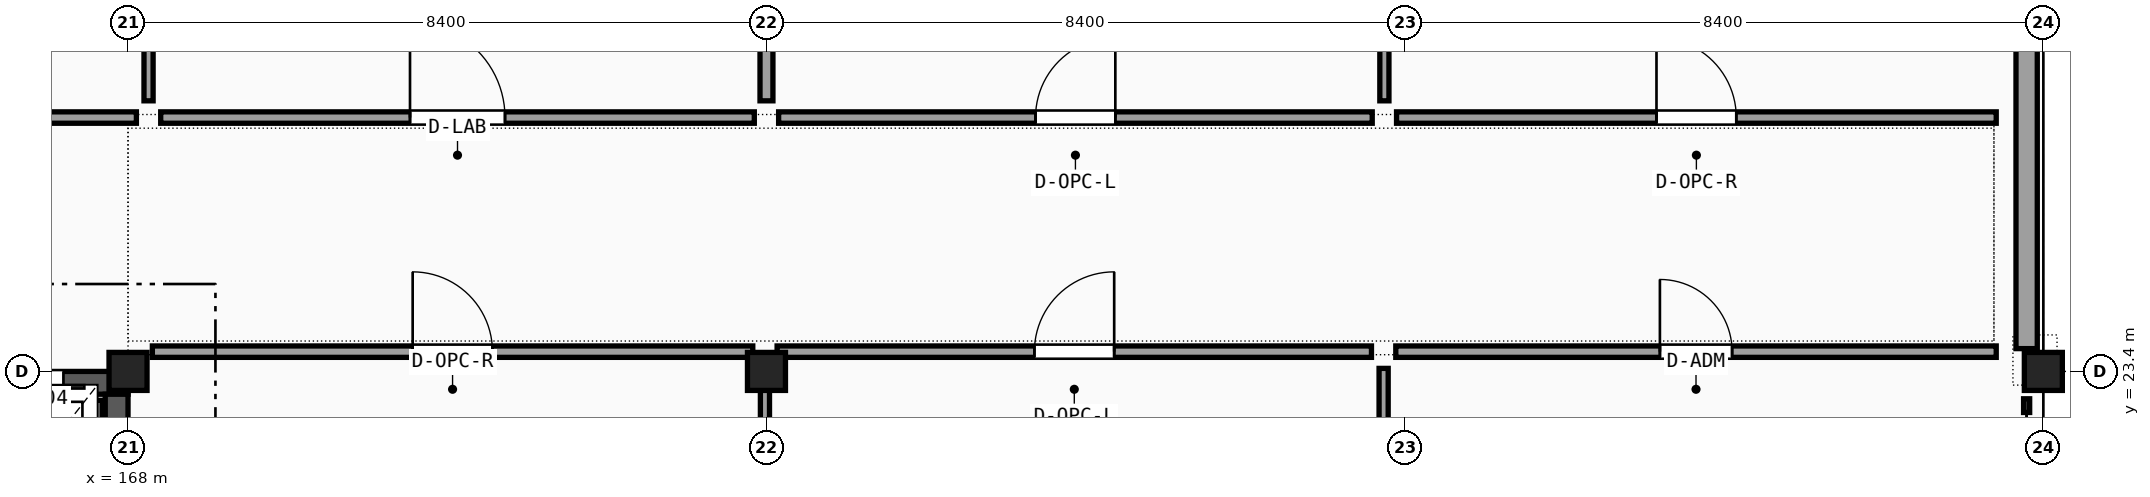
"""IFC4 building model, lengths in metres.
Left out: names, types, materials, properties, quantities, classifications, styles, units other than length and angle.
Written with IfcOpenShell. Run it as: python <this file> out.ifc"""

import sys

from ifc_helpers import new_model, si_unit, direction, frame, frame_2d, origin, origin_2d, place, context, subcontext, project, spatial, rectangle, extrude, element, fill, save


model = new_model("IFC4")
c1 = context("Model", 3, precision=1e-05, world=origin(), true_north=direction((0.0, 1.0)))
c2 = subcontext(c1, "Body", "Model", "MODEL_VIEW")
j1 = project(units=[si_unit("LENGTHUNIT", "METRE"), si_unit("PLANEANGLEUNIT", "RADIAN")], contexts=[c1])
p1 = place(None, origin())
s1 = spatial("IfcSite", under=j1, at=p1, CompositionType="ELEMENT")
p2 = place(p1, origin())
s2 = spatial("IfcBuilding", under=s1, at=p2, CompositionType="ELEMENT")
p3 = place(p2, frame((0.0, 0.0, 18.9)))
s3 = spatial("IfcBuildingStorey", under=s2, at=p3, CompositionType="ELEMENT", Elevation=18.9)
for number, where, z_axis, x_axis in (
    (1, (168.0, 23.4, 0.0), (0.0, 0.0, 1.0), (1.0, 0.0, 0.0)),
    (2, (176.4, 23.4, 0.0), (0.0, 0.0, 1.0), (1.0, 0.0, 0.0)),
    (3, (193.2, 23.4, 0.0), (0.0, 0.0, 1.0), (1.0, 0.0, 0.0)),
):
    element("IfcColumn", number, at=place(p3, frame(where, z_axis=z_axis, x_axis=x_axis)), inside=s3, PredefinedType="COLUMN", context=c2, shape_type="SweptSolid", body=[
        extrude(rectangle(XDim=0.5, YDim=0.5, at=origin_2d()), origin(), (0.0, 0.0, 1.0), 4.05),
    ])
p4 = place(p3, frame((192.98, 23.7, 0.0), z_axis=(0.0, 0.0, 1.0), x_axis=(0.0, 1.0, 0.0)))
e4 = element("IfcWall", 4, at=p4, inside=s3, PredefinedType="SOLIDWALL", context=c2, shape_type="SweptSolid", body=[
    extrude(rectangle(XDim=7.2, YDim=0.28, at=frame_2d((3.6, 0.0))), origin(), (0.0, 0.0, 1.0), 3.77),
])
p5 = place(p3, frame((159.6, 23.25, 0.0), z_axis=(0.0, 0.0, 1.0), x_axis=(1.0, 0.0, 0.0)))
e5 = element("IfcWall", 5, at=p5, inside=s3, PredefinedType="SHEAR", context=c2, shape_type="SweptSolid", body=[
    extrude(rectangle(XDim=8.4, YDim=0.3, at=frame_2d((4.2, 0.0))), origin(), (0.0, 0.0, 1.0), 3.8),
])
p6 = place(p5, frame((1.38, 0.0, 0.0)))
e6 = element("IfcOpeningElement", 6, at=p6, cuts=e5, PredefinedType="OPENING", context=c2, shape_type="SweptSolid", body=[
    extrude(rectangle(XDim=1.2, YDim=2.15, at=frame_2d((0.6, 1.075))), frame((0.0, 0.16, 0.0), z_axis=(0.0, -1.0, 0.0), x_axis=(1.0, 0.0, 0.0)), (0.0, 0.0, 1.0), 0.32),
])
p7 = place(p5, frame((4.43, 0.0, 0.0)))
e7 = element("IfcOpeningElement", 7, at=p7, cuts=e5, PredefinedType="OPENING", context=c2, shape_type="SweptSolid", body=[
    extrude(rectangle(XDim=1.1, YDim=2.15, at=frame_2d((0.55, 1.075))), frame((0.0, 0.16, 0.0), z_axis=(0.0, -1.0, 0.0), x_axis=(1.0, 0.0, 0.0)), (0.0, 0.0, 1.0), 0.32),
])
p8 = place(p5, frame((6.45, 0.0, 0.0)))
e8 = element("IfcOpeningElement", 8, at=p8, cuts=e5, PredefinedType="OPENING", context=c2, shape_type="SweptSolid", body=[
    extrude(rectangle(XDim=1.1, YDim=2.15, at=frame_2d((0.55, 1.075))), frame((0.0, 0.16, 0.0), z_axis=(0.0, -1.0, 0.0), x_axis=(1.0, 0.0, 0.0)), (0.0, 0.0, 1.0), 0.32),
])
p9 = place(p3, frame((167.85, 15.9, 0.0), z_axis=(0.0, 0.0, 1.0), x_axis=(0.0, 1.0, 0.0)))
e9 = element("IfcWall", 9, at=p9, inside=s3, PredefinedType="SHEAR", context=c2, shape_type="SweptSolid", body=[
    extrude(rectangle(XDim=7.2, YDim=0.3, at=frame_2d((3.6, 0.0))), origin(), (0.0, 0.0, 1.0), 3.8),
])
p10 = place(p3, frame((167.56, 20.88, 0.0), z_axis=(0.0, 0.0, 1.0), x_axis=(0.0, 1.0, 0.0)))
e10 = element("IfcWall", 10, at=p10, inside=s3, PredefinedType="PARTITIONING", context=c2, shape_type="SweptSolid", body=[
    extrude(rectangle(XDim=2.14, YDim=0.2, at=frame_2d((1.07, 0.0))), origin(), (0.0, 0.0, 1.0), 3.44),
])
p11 = place(p3, frame((168.32, 23.66, 0.0), z_axis=(0.0, 0.0, 1.0), x_axis=(1.0, 0.0, 0.0)))
e11 = element("IfcWall", 11, at=p11, inside=s3, PredefinedType="PARTITIONING", context=c2, shape_type="SweptSolid", body=[
    extrude(rectangle(XDim=7.9, YDim=0.15, at=frame_2d((3.95, 0.0))), origin(), (0.0, 0.0, 1.0), 3.44),
])
p12 = place(p11, frame((3.425, 0.0, 0.0)))
e12 = element("IfcOpeningElement", 12, at=p12, cuts=e11, PredefinedType="OPENING", context=c2, shape_type="SweptSolid", body=[
    extrude(rectangle(XDim=1.05, YDim=2.15, at=frame_2d((0.525, 1.075))), frame((0.0, 0.085, 0.0), z_axis=(0.0, -1.0, 0.0), x_axis=(1.0, 0.0, 0.0)), (0.0, 0.0, 1.0), 0.17),
])
p13 = place(p3, frame((176.38, 0.89, 0.0), z_axis=(0.0, 0.0, 1.0), x_axis=(0.0, 1.0, 0.0)))
e13 = element("IfcWall", 13, at=p13, inside=s3, PredefinedType="PARTITIONING", context=c2, shape_type="SweptSolid", body=[
    extrude(rectangle(XDim=22.55, YDim=0.12, at=frame_2d((11.275, 0.0))), origin(), (0.0, 0.0, 1.0), 3.44),
])
p14 = place(p3, frame((176.54, 23.66, 0.0), z_axis=(0.0, 0.0, 1.0), x_axis=(1.0, 0.0, 0.0)))
e14 = element("IfcWall", 14, at=p14, inside=s3, PredefinedType="PARTITIONING", context=c2, shape_type="SweptSolid", body=[
    extrude(rectangle(XDim=7.82, YDim=0.15, at=frame_2d((3.91, 0.0))), origin(), (0.0, 0.0, 1.0), 3.44),
])
p15 = place(p14, frame((3.385, 0.0, 0.0)))
e15 = element("IfcOpeningElement", 15, at=p15, cuts=e14, PredefinedType="OPENING", context=c2, shape_type="SweptSolid", body=[
    extrude(rectangle(XDim=1.05, YDim=2.15, at=frame_2d((0.525, 1.075))), frame((0.0, 0.085, 0.0), z_axis=(0.0, -1.0, 0.0), x_axis=(1.0, 0.0, 0.0)), (0.0, 0.0, 1.0), 0.17),
])
p16 = place(p3, frame((184.52, 0.89, 0.0), z_axis=(0.0, 0.0, 1.0), x_axis=(0.0, 1.0, 0.0)))
e16 = element("IfcWall", 16, at=p16, inside=s3, PredefinedType="PARTITIONING", context=c2, shape_type="SweptSolid", body=[
    extrude(rectangle(XDim=22.55, YDim=0.12, at=frame_2d((11.275, 0.0))), origin(), (0.0, 0.0, 1.0), 3.44),
])
p17 = place(p3, frame((184.68, 23.66, 0.0), z_axis=(0.0, 0.0, 1.0), x_axis=(1.0, 0.0, 0.0)))
e17 = element("IfcWall", 17, at=p17, inside=s3, PredefinedType="PARTITIONING", context=c2, shape_type="SweptSolid", body=[
    extrude(rectangle(XDim=7.9, YDim=0.15, at=frame_2d((3.95, 0.0))), origin(), (0.0, 0.0, 1.0), 3.44),
])
p18 = place(p17, frame((3.475, 0.0, 0.0)))
e18 = element("IfcOpeningElement", 18, at=p18, cuts=e17, PredefinedType="OPENING", context=c2, shape_type="SweptSolid", body=[
    extrude(rectangle(XDim=0.95, YDim=2.1, at=frame_2d((0.475, 1.05))), frame((0.0, 0.085, 0.0), z_axis=(0.0, -1.0, 0.0), x_axis=(1.0, 0.0, 0.0)), (0.0, 0.0, 1.0), 0.17),
])
p19 = place(p3, frame((160.22, 26.74, 0.0), z_axis=(0.0, 0.0, 1.0), x_axis=(1.0, 0.0, 0.0)))
e19 = element("IfcWall", 19, at=p19, inside=s3, PredefinedType="PARTITIONING", context=c2, shape_type="SweptSolid", body=[
    extrude(rectangle(XDim=7.89, YDim=0.15, at=frame_2d((3.945, 0.0))), origin(), (0.0, 0.0, 1.0), 3.77),
])
p20 = place(p19, frame((3.42, 0.0, 0.0)))
e20 = element("IfcOpeningElement", 20, at=p20, cuts=e19, PredefinedType="OPENING", context=c2, shape_type="SweptSolid", body=[
    extrude(rectangle(XDim=1.05, YDim=2.15, at=frame_2d((0.525, 1.075))), frame((0.0, 0.085, 0.0), z_axis=(0.0, -1.0, 0.0), x_axis=(1.0, 0.0, 0.0)), (0.0, 0.0, 1.0), 0.17),
])
p21 = place(p3, frame((168.27, 26.96, 0.0), z_axis=(0.0, 0.0, 1.0), x_axis=(0.0, 1.0, 0.0)))
e21 = element("IfcWall", 21, at=p21, inside=s3, PredefinedType="PARTITIONING", context=c2, shape_type="SweptSolid", body=[
    extrude(rectangle(XDim=11.35, YDim=0.12, at=frame_2d((5.675, 0.0))), origin(), (0.0, 0.0, 1.0), 3.77),
])
p22 = place(p3, frame((168.43, 26.74, 0.0), z_axis=(0.0, 0.0, 1.0), x_axis=(1.0, 0.0, 0.0)))
e22 = element("IfcWall", 22, at=p22, inside=s3, PredefinedType="PARTITIONING", context=c2, shape_type="SweptSolid", body=[
    extrude(rectangle(XDim=7.81, YDim=0.15, at=frame_2d((3.905, 0.0))), origin(), (0.0, 0.0, 1.0), 3.44),
])
p23 = place(p22, frame((3.28, 0.0, 0.0)))
e23 = element("IfcOpeningElement", 23, at=p23, cuts=e22, PredefinedType="OPENING", context=c2, shape_type="SweptSolid", body=[
    extrude(rectangle(XDim=1.25, YDim=2.2, at=frame_2d((0.625, 1.1))), frame((0.0, 0.085, 0.0), z_axis=(0.0, -1.0, 0.0), x_axis=(1.0, 0.0, 0.0)), (0.0, 0.0, 1.0), 0.17),
])
p24 = place(p3, frame((176.4, 26.96, 0.0), z_axis=(0.0, 0.0, 1.0), x_axis=(0.0, 1.0, 0.0)))
e24 = element("IfcWall", 24, at=p24, inside=s3, PredefinedType="PARTITIONING", context=c2, shape_type="SweptSolid", body=[
    extrude(rectangle(XDim=11.35, YDim=0.17, at=frame_2d((5.675, 0.0))), origin(), (0.0, 0.0, 1.0), 3.44),
])
p25 = place(p3, frame((176.56, 26.74, 0.0), z_axis=(0.0, 0.0, 1.0), x_axis=(1.0, 0.0, 0.0)))
e25 = element("IfcWall", 25, at=p25, inside=s3, PredefinedType="PARTITIONING", context=c2, shape_type="SweptSolid", body=[
    extrude(rectangle(XDim=7.81, YDim=0.15, at=frame_2d((3.905, 0.0))), origin(), (0.0, 0.0, 1.0), 3.44),
])
p26 = place(p25, frame((3.38, 0.0, 0.0)))
e26 = element("IfcOpeningElement", 26, at=p26, cuts=e25, PredefinedType="OPENING", context=c2, shape_type="SweptSolid", body=[
    extrude(rectangle(XDim=1.05, YDim=2.15, at=frame_2d((0.525, 1.075))), frame((0.0, 0.085, 0.0), z_axis=(0.0, -1.0, 0.0), x_axis=(1.0, 0.0, 0.0)), (0.0, 0.0, 1.0), 0.17),
])
p27 = place(p3, frame((184.53, 26.96, 0.0), z_axis=(0.0, 0.0, 1.0), x_axis=(0.0, 1.0, 0.0)))
e27 = element("IfcWall", 27, at=p27, inside=s3, PredefinedType="PARTITIONING", context=c2, shape_type="SweptSolid", body=[
    extrude(rectangle(XDim=11.35, YDim=0.12, at=frame_2d((5.675, 0.0))), origin(), (0.0, 0.0, 1.0), 3.44),
])
p28 = place(p3, frame((184.69, 26.74, 0.0), z_axis=(0.0, 0.0, 1.0), x_axis=(1.0, 0.0, 0.0)))
e28 = element("IfcWall", 28, at=p28, inside=s3, PredefinedType="PARTITIONING", context=c2, shape_type="SweptSolid", body=[
    extrude(rectangle(XDim=7.89, YDim=0.15, at=frame_2d((3.945, 0.0))), origin(), (0.0, 0.0, 1.0), 3.44),
])
p29 = place(p28, frame((3.42, 0.0, 0.0)))
e29 = element("IfcOpeningElement", 29, at=p29, cuts=e28, PredefinedType="OPENING", context=c2, shape_type="SweptSolid", body=[
    extrude(rectangle(XDim=1.05, YDim=2.15, at=frame_2d((0.525, 1.075))), frame((0.0, 0.085, 0.0), z_axis=(0.0, -1.0, 0.0), x_axis=(1.0, 0.0, 0.0)), (0.0, 0.0, 1.0), 0.17),
])
p30 = place(p8, origin())
e30 = element("IfcDoor", 30, at=p30, inside=s3, OperationType="DOUBLE_DOOR_SLIDING", PredefinedType="DOOR", context=c2, shape_type="SweptSolid", body=[
    extrude(rectangle(XDim=1.1, YDim=2.15, at=frame_2d((0.55, 1.075))), frame((0.0, 0.025, 0.0), z_axis=(0.0, -1.0, 0.0), x_axis=(1.0, 0.0, 0.0)), (0.0, 0.0, 1.0), 0.05),
])
fill(e8, e30)
p31 = place(p12, origin())
e31 = element("IfcDoor", 31, at=p31, inside=s3, OperationType="SINGLE_SWING_LEFT", PredefinedType="DOOR", context=c2, shape_type="SweptSolid", body=[
    extrude(rectangle(XDim=1.05, YDim=2.15, at=frame_2d((0.525, 1.075))), frame((0.0, 0.025, 0.0), z_axis=(0.0, -1.0, 0.0), x_axis=(1.0, 0.0, 0.0)), (0.0, 0.0, 1.0), 0.05),
])
fill(e12, e31)
p32 = place(p15, origin())
e32 = element("IfcDoor", 32, at=p32, inside=s3, OperationType="SINGLE_SWING_RIGHT", PredefinedType="DOOR", context=c2, shape_type="SweptSolid", body=[
    extrude(rectangle(XDim=1.05, YDim=2.15, at=frame_2d((0.525, 1.075))), frame((0.0, 0.025, 0.0), z_axis=(0.0, -1.0, 0.0), x_axis=(1.0, 0.0, 0.0)), (0.0, 0.0, 1.0), 0.05),
])
fill(e15, e32)
p33 = place(p18, origin())
e33 = element("IfcDoor", 33, at=p33, inside=s3, OperationType="SINGLE_SWING_LEFT", PredefinedType="DOOR", context=c2, shape_type="SweptSolid", body=[
    extrude(rectangle(XDim=0.95, YDim=2.1, at=frame_2d((0.475, 1.05))), frame((0.0, 0.025, 0.0), z_axis=(0.0, -1.0, 0.0), x_axis=(1.0, 0.0, 0.0)), (0.0, 0.0, 1.0), 0.05),
])
fill(e18, e33)
p34 = place(p23, origin())
e34 = element("IfcDoor", 34, at=p34, inside=s3, OperationType="SINGLE_SWING_LEFT", PredefinedType="DOOR", context=c2, shape_type="SweptSolid", body=[
    extrude(rectangle(XDim=1.25, YDim=2.2, at=frame_2d((0.625, 1.1))), frame((0.0, 0.025, 0.0), z_axis=(0.0, -1.0, 0.0), x_axis=(1.0, 0.0, 0.0)), (0.0, 0.0, 1.0), 0.05),
])
fill(e23, e34)
p35 = place(p26, origin())
e35 = element("IfcDoor", 35, at=p35, inside=s3, OperationType="SINGLE_SWING_RIGHT", PredefinedType="DOOR", context=c2, shape_type="SweptSolid", body=[
    extrude(rectangle(XDim=1.05, YDim=2.15, at=frame_2d((0.525, 1.075))), frame((0.0, 0.025, 0.0), z_axis=(0.0, -1.0, 0.0), x_axis=(1.0, 0.0, 0.0)), (0.0, 0.0, 1.0), 0.05),
])
fill(e26, e35)
p36 = place(p29, origin())
e36 = element("IfcDoor", 36, at=p36, inside=s3, OperationType="SINGLE_SWING_LEFT", PredefinedType="DOOR", context=c2, shape_type="SweptSolid", body=[
    extrude(rectangle(XDim=1.05, YDim=2.15, at=frame_2d((0.525, 1.075))), frame((0.0, 0.025, 0.0), z_axis=(0.0, -1.0, 0.0), x_axis=(1.0, 0.0, 0.0)), (0.0, 0.0, 1.0), 0.05),
])
fill(e29, e36)
save(model, sys.argv[1])
